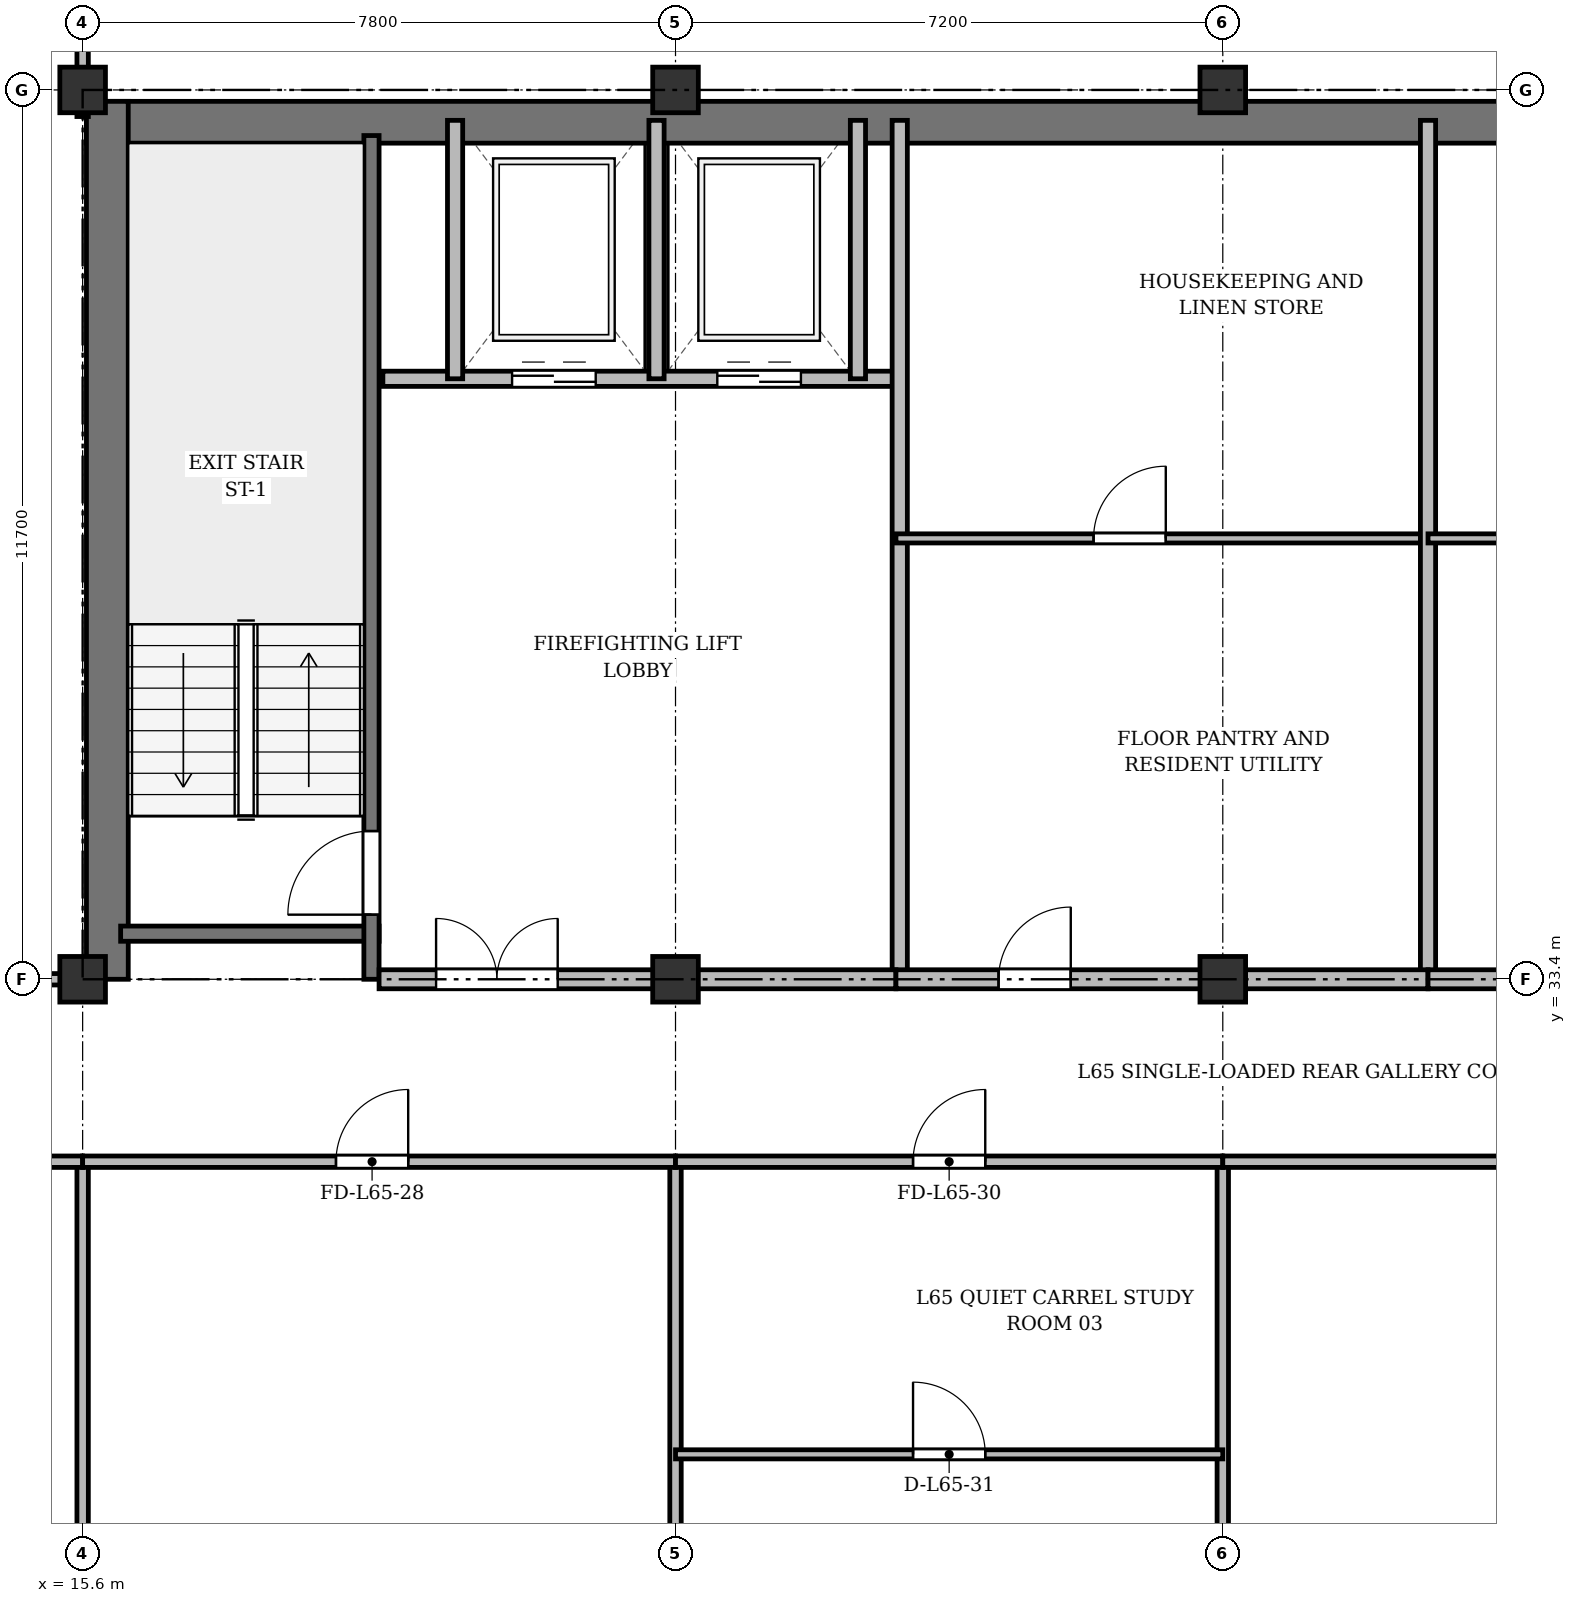
"""IFC4 building model, lengths in metres.
Left out: names, types, materials, properties, quantities, classifications, styles, units other than length and angle.
Written with IfcOpenShell. Run it as: python <this file> out.ifc"""

import sys

from ifc_helpers import new_model, si_unit, direction, frame, frame_2d, origin, origin_2d, place, context, subcontext, project, spatial, rectangle, extrude, source, transform, mapped, element, fill, save


model = new_model("IFC4")
c1 = context("Model", 3, precision=1e-05, world=origin(), true_north=direction((0.0, 1.0)))
c2 = subcontext(c1, "Body", "Model", "MODEL_VIEW")
j1 = project(units=[si_unit("LENGTHUNIT", "METRE"), si_unit("PLANEANGLEUNIT", "RADIAN")], contexts=[c1])
p1 = place(None, origin())
s1 = spatial("IfcSite", under=j1, at=p1, CompositionType="ELEMENT")
p2 = place(p1, origin())
s2 = spatial("IfcBuilding", under=s1, at=p2, CompositionType="ELEMENT")
p3 = place(p2, frame((0.0, 0.0, 252.3)))
s3 = spatial("IfcBuildingStorey", under=s2, at=p3, CompositionType="ELEMENT", Elevation=252.3)
m1 = source(origin(), c2, "Body", "SweptSolid", [
    extrude(rectangle(XDim=0.6, YDim=0.6, at=origin_2d()), origin(), (0.0, 0.0, 1.0), 3.6),
])
for number, where, z_axis, x_axis in (
    (1, (15.6, 33.4, 0.0), (0.0, 0.0, 1.0), (1.0, 0.0, 0.0)),
    (2, (15.6, 45.1, 0.0), (0.0, 0.0, 1.0), (1.0, 0.0, 0.0)),
    (3, (23.4, 33.4, 0.0), (0.0, 0.0, 1.0), (1.0, 0.0, 0.0)),
    (4, (23.4, 45.1, 0.0), (0.0, 0.0, 1.0), (1.0, 0.0, 0.0)),
    (5, (30.6, 33.4, 0.0), (0.0, 0.0, 1.0), (1.0, 0.0, 0.0)),
    (6, (30.6, 45.1, 0.0), (0.0, 0.0, 1.0), (1.0, 0.0, 0.0)),
):
    element("IfcColumn", number, at=place(p3, frame(where, z_axis=z_axis, x_axis=x_axis)), inside=s3, PredefinedType="COLUMN", context=c2, shape_type="MappedRepresentation", body=[
        mapped(m1, transform((0.0, 0.0, 0.0), x_axis=(1.0, 0.0, 0.0), y_axis=(0.0, 1.0, 0.0), z_axis=(0.0, 0.0, 1.0), scale=1.0)),
    ])
p4 = place(p3, frame((15.65, 44.675, 0.0), z_axis=(0.0, 0.0, 1.0), x_axis=(1.0, 0.0, 0.0)))
e7 = element("IfcWall", 7, at=p4, inside=s3, PredefinedType="SHEAR", context=c2, shape_type="SweptSolid", body=[
    extrude(rectangle(XDim=43.1, YDim=0.55, at=frame_2d((21.55, 0.0))), origin(), (0.0, 0.0, 1.0), 3.37),
])
p5 = place(p3, frame((15.925, 33.4, 0.0), z_axis=(0.0, 0.0, 1.0), x_axis=(0.0, 1.0, 0.0)))
e8 = element("IfcWall", 8, at=p5, inside=s3, PredefinedType="SHEAR", context=c2, shape_type="SweptSolid", body=[
    extrude(rectangle(XDim=11.55, YDim=0.55, at=frame_2d((5.775, 0.0))), origin(), (0.0, 0.0, 1.0), 3.37),
])
p6 = place(p3, frame((16.1, 34.0, 0.0), z_axis=(0.0, 0.0, 1.0), x_axis=(1.0, 0.0, 0.0)))
e9 = element("IfcWall", 9, at=p6, inside=s3, PredefinedType="SHEAR", context=c2, shape_type="SweptSolid", body=[
    extrude(rectangle(XDim=3.4, YDim=0.2, at=frame_2d((1.7, 0.0))), origin(), (0.0, 0.0, 1.0), 3.37),
])
p7 = place(p3, frame((19.4, 33.4, 0.0), z_axis=(0.0, 0.0, 1.0), x_axis=(0.0, 1.0, 0.0)))
e10 = element("IfcWall", 10, at=p7, inside=s3, PredefinedType="SHEAR", context=c2, shape_type="SweptSolid", body=[
    extrude(rectangle(XDim=11.1, YDim=0.2, at=frame_2d((5.55, 0.0))), origin(), (0.0, 0.0, 1.0), 3.37),
])
p8 = place(p7, frame((0.85, 0.0, 0.0)))
e11 = element("IfcOpeningElement", 11, at=p8, cuts=e10, PredefinedType="OPENING", context=c2, shape_type="SweptSolid", body=[
    extrude(rectangle(XDim=1.1, YDim=2.15, at=frame_2d((0.55, 1.075))), frame((0.0, 0.11, 0.0), z_axis=(0.0, -1.0, 0.0), x_axis=(1.0, 0.0, 0.0)), (0.0, 0.0, 1.0), 0.22),
])
p9 = place(p3, frame((19.55, 41.3, 0.0), z_axis=(0.0, 0.0, 1.0), x_axis=(1.0, 0.0, 0.0)))
e12 = element("IfcWall", 12, at=p9, inside=s3, PredefinedType="SOLIDWALL", context=c2, shape_type="SweptSolid", body=[
    extrude(rectangle(XDim=6.75, YDim=0.2, at=frame_2d((3.375, 0.0))), origin(), (0.0, 0.0, 1.0), 3.37),
])
p10 = place(p9, frame((1.7, 0.0, 0.0)))
e13 = element("IfcOpeningElement", 13, at=p10, cuts=e12, PredefinedType="OPENING", context=c2, shape_type="SweptSolid", body=[
    extrude(rectangle(XDim=1.1, YDim=2.15, at=frame_2d((0.55, 1.075))), frame((0.0, 0.11, 0.0), z_axis=(0.0, -1.0, 0.0), x_axis=(1.0, 0.0, 0.0)), (0.0, 0.0, 1.0), 0.22),
])
p11 = place(p9, frame((4.4, 0.0, 0.0)))
e14 = element("IfcOpeningElement", 14, at=p11, cuts=e12, PredefinedType="OPENING", context=c2, shape_type="SweptSolid", body=[
    extrude(rectangle(XDim=1.1, YDim=2.15, at=frame_2d((0.55, 1.075))), frame((0.0, 0.11, 0.0), z_axis=(0.0, -1.0, 0.0), x_axis=(1.0, 0.0, 0.0)), (0.0, 0.0, 1.0), 0.22),
])
for number, where, z_axis, x_axis in (
    (15, (20.5, 41.3, 0.0), (0.0, 0.0, 1.0), (0.0, 1.0, 0.0)),
    (16, (23.15, 41.3, 0.0), (0.0, 0.0, 1.0), (0.0, 1.0, 0.0)),
    (17, (25.8, 41.3, 0.0), (0.0, 0.0, 1.0), (0.0, 1.0, 0.0)),
):
    element("IfcWall", number, at=place(p3, frame(where, z_axis=z_axis, x_axis=x_axis)), inside=s3, PredefinedType="SOLIDWALL", context=c2, shape_type="SweptSolid", body=[
        extrude(rectangle(XDim=3.4, YDim=0.2, at=frame_2d((1.7, 0.0))), origin(), (0.0, 0.0, 1.0), 3.37),
    ])
p12 = place(p3, frame((26.35, 33.4, 0.0), z_axis=(0.0, 0.0, 1.0), x_axis=(0.0, 1.0, 0.0)))
e18 = element("IfcWall", 18, at=p12, inside=s3, PredefinedType="SOLIDWALL", context=c2, shape_type="SweptSolid", body=[
    extrude(rectangle(XDim=11.3, YDim=0.2, at=frame_2d((5.65, 0.0))), origin(), (0.0, 0.0, 1.0), 2.92),
])
p13 = place(p3, frame((19.5, 33.4, 0.0), z_axis=(0.0, 0.0, 1.0), x_axis=(1.0, 0.0, 0.0)))
e19 = element("IfcWall", 19, at=p13, inside=s3, PredefinedType="PARTITIONING", context=c2, shape_type="SweptSolid", body=[
    extrude(rectangle(XDim=6.8, YDim=0.25, at=frame_2d((3.4, 0.0))), origin(), (0.0, 0.0, 1.0), 2.92),
])
p14 = place(p13, frame((0.75, 0.0, 0.0)))
e20 = element("IfcOpeningElement", 20, at=p14, cuts=e19, PredefinedType="OPENING", context=c2, shape_type="SweptSolid", body=[
    extrude(rectangle(XDim=1.6, YDim=2.2, at=frame_2d((0.8, 1.1))), frame((0.0, 0.135, 0.0), z_axis=(0.0, -1.0, 0.0), x_axis=(1.0, 0.0, 0.0)), (0.0, 0.0, 1.0), 0.27),
])
p15 = place(p3, frame((26.3, 39.2, 0.0), z_axis=(0.0, 0.0, 1.0), x_axis=(1.0, 0.0, 0.0)))
e21 = element("IfcWall", 21, at=p15, inside=s3, PredefinedType="PARTITIONING", context=c2, shape_type="SweptSolid", body=[
    extrude(rectangle(XDim=7.0, YDim=0.12, at=frame_2d((3.5, 0.0))), origin(), (0.0, 0.0, 1.0), 2.87),
])
p16 = place(p15, frame((2.6, 0.0, 0.0)))
e22 = element("IfcOpeningElement", 22, at=p16, cuts=e21, PredefinedType="OPENING", context=c2, shape_type="SweptSolid", body=[
    extrude(rectangle(XDim=0.95, YDim=2.15, at=frame_2d((0.475, 1.075))), frame((0.0, 0.07, 0.0), z_axis=(0.0, -1.0, 0.0), x_axis=(1.0, 0.0, 0.0)), (0.0, 0.0, 1.0), 0.14),
])
p17 = place(p3, frame((33.3, 33.4, 0.0), z_axis=(0.0, 0.0, 1.0), x_axis=(0.0, 1.0, 0.0)))
e23 = element("IfcWall", 23, at=p17, inside=s3, PredefinedType="SOLIDWALL", context=c2, shape_type="SweptSolid", body=[
    extrude(rectangle(XDim=11.3, YDim=0.2, at=frame_2d((5.65, 0.0))), origin(), (0.0, 0.0, 1.0), 2.92),
])
p18 = place(p3, frame((33.3, 39.2, 0.0), z_axis=(0.0, 0.0, 1.0), x_axis=(1.0, 0.0, 0.0)))
e24 = element("IfcWall", 24, at=p18, inside=s3, PredefinedType="PARTITIONING", context=c2, shape_type="SweptSolid", body=[
    extrude(rectangle(XDim=6.8, YDim=0.12, at=frame_2d((3.4, 0.0))), origin(), (0.0, 0.0, 1.0), 3.37),
])
p19 = place(p18, frame((2.6, 0.0, 0.0)))
e25 = element("IfcOpeningElement", 25, at=p19, cuts=e24, PredefinedType="OPENING", context=c2, shape_type="SweptSolid", body=[
    extrude(rectangle(XDim=0.95, YDim=2.15, at=frame_2d((0.475, 1.075))), frame((0.0, 0.07, 0.0), z_axis=(0.0, -1.0, 0.0), x_axis=(1.0, 0.0, 0.0)), (0.0, 0.0, 1.0), 0.14),
])
p20 = place(p3, frame((26.3, 33.4, 0.0), z_axis=(0.0, 0.0, 1.0), x_axis=(1.0, 0.0, 0.0)))
e26 = element("IfcWall", 26, at=p20, inside=s3, PredefinedType="PARTITIONING", context=c2, shape_type="SweptSolid", body=[
    extrude(rectangle(XDim=7.0, YDim=0.25, at=frame_2d((3.5, 0.0))), origin(), (0.0, 0.0, 1.0), 2.92),
])
p21 = place(p20, frame((1.35, 0.0, 0.0)))
e27 = element("IfcOpeningElement", 27, at=p21, cuts=e26, PredefinedType="OPENING", context=c2, shape_type="SweptSolid", body=[
    extrude(rectangle(XDim=0.95, YDim=2.15, at=frame_2d((0.475, 1.075))), frame((0.0, 0.135, 0.0), z_axis=(0.0, -1.0, 0.0), x_axis=(1.0, 0.0, 0.0)), (0.0, 0.0, 1.0), 0.27),
])
p22 = place(p3, frame((33.3, 33.4, 0.0), z_axis=(0.0, 0.0, 1.0), x_axis=(1.0, 0.0, 0.0)))
e28 = element("IfcWall", 28, at=p22, inside=s3, PredefinedType="PARTITIONING", context=c2, shape_type="SweptSolid", body=[
    extrude(rectangle(XDim=6.8, YDim=0.25, at=frame_2d((3.4, 0.0))), origin(), (0.0, 0.0, 1.0), 2.92),
])
p23 = place(p22, frame((2.4, 0.0, 0.0)))
e29 = element("IfcOpeningElement", 29, at=p23, cuts=e28, PredefinedType="OPENING", context=c2, shape_type="SweptSolid", body=[
    extrude(rectangle(XDim=1.0, YDim=2.15, at=frame_2d((0.5, 1.075))), frame((0.0, 0.135, 0.0), z_axis=(0.0, -1.0, 0.0), x_axis=(1.0, 0.0, 0.0)), (0.0, 0.0, 1.0), 0.27),
])
p24 = place(p3, frame((8.45, 33.4, 0.0), z_axis=(0.0, 0.0, 1.0), x_axis=(1.0, 0.0, 0.0)))
e30 = element("IfcWall", 30, at=p24, inside=s3, PredefinedType="PARTITIONING", context=c2, shape_type="SweptSolid", body=[
    extrude(rectangle(XDim=7.15, YDim=0.15, at=frame_2d((3.575, 0.0))), origin(), (0.0, 0.0, 1.0), 2.92),
])
p25 = place(p24, frame((3.0, 0.0, 0.0)))
e31 = element("IfcOpeningElement", 31, at=p25, cuts=e30, PredefinedType="OPENING", context=c2, shape_type="SweptSolid", body=[
    extrude(rectangle(XDim=0.95, YDim=2.15, at=frame_2d((0.475, 1.075))), frame((0.0, 0.085, 0.0), z_axis=(0.0, -1.0, 0.0), x_axis=(1.0, 0.0, 0.0)), (0.0, 0.0, 1.0), 0.17),
])
p26 = place(p3, frame((15.6, 44.75, 0.0), z_axis=(0.0, 0.0, 1.0), x_axis=(0.0, 1.0, 0.0)))
e32 = element("IfcWall", 32, at=p26, inside=s3, PredefinedType="PARTITIONING", context=c2, shape_type="SweptSolid", body=[
    extrude(rectangle(XDim=3.61, YDim=0.15, at=frame_2d((1.805, 0.0))), origin(), (0.0, 0.0, 1.0), 2.87),
])
p27 = place(p26, frame((1.1, 0.0, 0.0)))
e33 = element("IfcOpeningElement", 33, at=p27, cuts=e32, PredefinedType="OPENING", context=c2, shape_type="SweptSolid", body=[
    extrude(rectangle(XDim=0.95, YDim=2.15, at=frame_2d((0.475, 1.075))), frame((0.0, 0.085, 0.0), z_axis=(0.0, -1.0, 0.0), x_axis=(1.0, 0.0, 0.0)), (0.0, 0.0, 1.0), 0.17),
])
for number, where, z_axis, x_axis in (
    (34, (15.6, 3.725, 0.0), (0.0, 0.0, 1.0), (0.0, 1.0, 0.0)),
    (35, (23.4, 3.725, 0.0), (0.0, 0.0, 1.0), (0.0, 1.0, 0.0)),
    (36, (30.6, 3.725, 0.0), (0.0, 0.0, 1.0), (0.0, 1.0, 0.0)),
):
    element("IfcWall", number, at=place(p3, frame(where, z_axis=z_axis, x_axis=x_axis)), inside=s3, PredefinedType="PARTITIONING", context=c2, shape_type="SweptSolid", body=[
        extrude(rectangle(XDim=27.275, YDim=0.15, at=frame_2d((13.637, 0.0))), origin(), (0.0, 0.0, 1.0), 2.87),
    ])
p28 = place(p3, frame((8.425, 31.0, 0.0), z_axis=(0.0, 0.0, 1.0), x_axis=(1.0, 0.0, 0.0)))
e37 = element("IfcWall", 37, at=p28, inside=s3, PredefinedType="PARTITIONING", context=c2, shape_type="SweptSolid", body=[
    extrude(rectangle(XDim=7.175, YDim=0.15, at=frame_2d((3.587, 0.0))), origin(), (0.0, 0.0, 1.0), 2.87),
])
p29 = place(p28, frame((3.112, 0.0, 0.0)))
e38 = element("IfcOpeningElement", 38, at=p29, cuts=e37, PredefinedType="OPENING", context=c2, shape_type="SweptSolid", body=[
    extrude(rectangle(XDim=0.95, YDim=2.15, at=frame_2d((0.475, 1.075))), frame((0.0, 0.085, 0.0), z_axis=(0.0, -1.0, 0.0), x_axis=(1.0, 0.0, 0.0)), (0.0, 0.0, 1.0), 0.17),
])
p30 = place(p3, frame((15.6, 31.0, 0.0), z_axis=(0.0, 0.0, 1.0), x_axis=(1.0, 0.0, 0.0)))
e39 = element("IfcWall", 39, at=p30, inside=s3, PredefinedType="PARTITIONING", context=c2, shape_type="SweptSolid", body=[
    extrude(rectangle(XDim=7.8, YDim=0.15, at=frame_2d((3.9, 0.0))), origin(), (0.0, 0.0, 1.0), 2.87),
])
p31 = place(p30, frame((3.333, 0.0, 0.0)))
e40 = element("IfcOpeningElement", 40, at=p31, cuts=e39, PredefinedType="OPENING", context=c2, shape_type="SweptSolid", body=[
    extrude(rectangle(XDim=0.95, YDim=2.15, at=frame_2d((0.475, 1.075))), frame((0.0, 0.085, 0.0), z_axis=(0.0, -1.0, 0.0), x_axis=(1.0, 0.0, 0.0)), (0.0, 0.0, 1.0), 0.17),
])
p32 = place(p3, frame((23.4, 31.0, 0.0), z_axis=(0.0, 0.0, 1.0), x_axis=(1.0, 0.0, 0.0)))
e41 = element("IfcWall", 41, at=p32, inside=s3, PredefinedType="PARTITIONING", context=c2, shape_type="SweptSolid", body=[
    extrude(rectangle(XDim=7.2, YDim=0.15, at=frame_2d((3.6, 0.0))), origin(), (0.0, 0.0, 1.0), 2.87),
])
p33 = place(p32, frame((3.125, 0.0, 0.0)))
e42 = element("IfcOpeningElement", 42, at=p33, cuts=e41, PredefinedType="OPENING", context=c2, shape_type="SweptSolid", body=[
    extrude(rectangle(XDim=0.95, YDim=2.15, at=frame_2d((0.475, 1.075))), frame((0.0, 0.085, 0.0), z_axis=(0.0, -1.0, 0.0), x_axis=(1.0, 0.0, 0.0)), (0.0, 0.0, 1.0), 0.17),
])
p34 = place(p3, frame((23.4, 27.15, 0.0), z_axis=(0.0, 0.0, 1.0), x_axis=(1.0, 0.0, 0.0)))
e43 = element("IfcWall", 43, at=p34, inside=s3, PredefinedType="PARTITIONING", context=c2, shape_type="SweptSolid", body=[
    extrude(rectangle(XDim=7.2, YDim=0.12, at=frame_2d((3.6, 0.0))), origin(), (0.0, 0.0, 1.0), 2.87),
])
p35 = place(p34, frame((3.125, 0.0, 0.0)))
e44 = element("IfcOpeningElement", 44, at=p35, cuts=e43, PredefinedType="OPENING", context=c2, shape_type="SweptSolid", body=[
    extrude(rectangle(XDim=0.95, YDim=2.15, at=frame_2d((0.475, 1.075))), frame((0.0, 0.07, 0.0), z_axis=(0.0, -1.0, 0.0), x_axis=(1.0, 0.0, 0.0)), (0.0, 0.0, 1.0), 0.14),
])
p36 = place(p3, frame((30.6, 31.0, 0.0), z_axis=(0.0, 0.0, 1.0), x_axis=(1.0, 0.0, 0.0)))
e45 = element("IfcWall", 45, at=p36, inside=s3, PredefinedType="PARTITIONING", context=c2, shape_type="SweptSolid", body=[
    extrude(rectangle(XDim=13.2, YDim=0.15, at=frame_2d((6.6, 0.0))), origin(), (0.0, 0.0, 1.0), 2.87),
])
p37 = place(p36, frame((5.8, 0.0, 0.0)))
e46 = element("IfcOpeningElement", 46, at=p37, cuts=e45, PredefinedType="OPENING", context=c2, shape_type="SweptSolid", body=[
    extrude(rectangle(XDim=1.6, YDim=2.2, at=frame_2d((0.8, 1.1))), frame((0.0, 0.085, 0.0), z_axis=(0.0, -1.0, 0.0), x_axis=(1.0, 0.0, 0.0)), (0.0, 0.0, 1.0), 0.17),
])
m2 = source(origin(), c2, "Body", "SweptSolid", [
    extrude(rectangle(XDim=1.1, YDim=2.15, at=frame_2d((0.55, 1.075))), frame((0.0, 0.025, 0.0), z_axis=(0.0, -1.0, 0.0), x_axis=(1.0, 0.0, 0.0)), (0.0, 0.0, 1.0), 0.05),
])
p38 = place(p8, origin())
e47 = element("IfcDoor", 47, at=p38, inside=s3, OperationType="SINGLE_SWING_LEFT", PredefinedType="DOOR", context=c2, shape_type="MappedRepresentation", body=[
    mapped(m2, transform((0.0, 0.0, 0.0), x_axis=(1.0, 0.0, 0.0), y_axis=(0.0, 1.0, 0.0), z_axis=(0.0, 0.0, 1.0), scale=1.0)),
])
fill(e11, e47)
p39 = place(p10, origin())
e48 = element("IfcDoor", 48, at=p39, inside=s3, OperationType="DOUBLE_DOOR_SLIDING", PredefinedType="DOOR", context=c2, shape_type="MappedRepresentation", body=[
    mapped(m2, transform((0.0, 0.0, 0.0), x_axis=(1.0, 0.0, 0.0), y_axis=(0.0, 1.0, 0.0), z_axis=(0.0, 0.0, 1.0), scale=1.0)),
])
fill(e13, e48)
p40 = place(p11, origin())
e49 = element("IfcDoor", 49, at=p40, inside=s3, OperationType="DOUBLE_DOOR_SLIDING", PredefinedType="DOOR", context=c2, shape_type="MappedRepresentation", body=[
    mapped(m2, transform((0.0, 0.0, 0.0), x_axis=(1.0, 0.0, 0.0), y_axis=(0.0, 1.0, 0.0), z_axis=(0.0, 0.0, 1.0), scale=1.0)),
])
fill(e14, e49)
m3 = source(origin(), c2, "Body", "SweptSolid", [
    extrude(rectangle(XDim=1.6, YDim=2.2, at=frame_2d((0.8, 1.1))), frame((0.0, 0.025, 0.0), z_axis=(0.0, -1.0, 0.0), x_axis=(1.0, 0.0, 0.0)), (0.0, 0.0, 1.0), 0.05),
])
p41 = place(p14, origin())
e50 = element("IfcDoor", 50, at=p41, inside=s3, OperationType="DOUBLE_DOOR_SINGLE_SWING", PredefinedType="DOOR", context=c2, shape_type="MappedRepresentation", body=[
    mapped(m3, transform((0.0, 0.0, 0.0), x_axis=(1.0, 0.0, 0.0), y_axis=(0.0, 1.0, 0.0), z_axis=(0.0, 0.0, 1.0), scale=1.0)),
])
fill(e20, e50)
m4 = source(origin(), c2, "Body", "SweptSolid", [
    extrude(rectangle(XDim=0.95, YDim=2.15, at=frame_2d((0.475, 1.075))), frame((0.0, 0.025, 0.0), z_axis=(0.0, -1.0, 0.0), x_axis=(1.0, 0.0, 0.0)), (0.0, 0.0, 1.0), 0.05),
])
p42 = place(p16, origin())
e51 = element("IfcDoor", 51, at=p42, inside=s3, OperationType="SINGLE_SWING_RIGHT", PredefinedType="DOOR", context=c2, shape_type="MappedRepresentation", body=[
    mapped(m4, transform((0.0, 0.0, 0.0), x_axis=(1.0, 0.0, 0.0), y_axis=(0.0, 1.0, 0.0), z_axis=(0.0, 0.0, 1.0), scale=1.0)),
])
fill(e22, e51)
p43 = place(p21, origin())
e52 = element("IfcDoor", 52, at=p43, inside=s3, OperationType="SINGLE_SWING_RIGHT", PredefinedType="DOOR", context=c2, shape_type="MappedRepresentation", body=[
    mapped(m4, transform((0.0, 0.0, 0.0), x_axis=(1.0, 0.0, 0.0), y_axis=(0.0, 1.0, 0.0), z_axis=(0.0, 0.0, 1.0), scale=1.0)),
])
fill(e27, e52)
p44 = place(p31, origin())
e53 = element("IfcDoor", 53, at=p44, inside=s3, OperationType="SINGLE_SWING_RIGHT", PredefinedType="DOOR", context=c2, shape_type="MappedRepresentation", body=[
    mapped(m4, transform((0.0, 0.0, 0.0), x_axis=(1.0, 0.0, 0.0), y_axis=(0.0, 1.0, 0.0), z_axis=(0.0, 0.0, 1.0), scale=1.0)),
])
fill(e40, e53)
p45 = place(p33, origin())
e54 = element("IfcDoor", 54, at=p45, inside=s3, OperationType="SINGLE_SWING_RIGHT", PredefinedType="DOOR", context=c2, shape_type="MappedRepresentation", body=[
    mapped(m4, transform((0.0, 0.0, 0.0), x_axis=(1.0, 0.0, 0.0), y_axis=(0.0, 1.0, 0.0), z_axis=(0.0, 0.0, 1.0), scale=1.0)),
])
fill(e42, e54)
p46 = place(p35, origin())
e55 = element("IfcDoor", 55, at=p46, inside=s3, OperationType="SINGLE_SWING_LEFT", PredefinedType="DOOR", context=c2, shape_type="MappedRepresentation", body=[
    mapped(m4, transform((0.0, 0.0, 0.0), x_axis=(1.0, 0.0, 0.0), y_axis=(0.0, 1.0, 0.0), z_axis=(0.0, 0.0, 1.0), scale=1.0)),
])
fill(e44, e55)
save(model, sys.argv[1])
